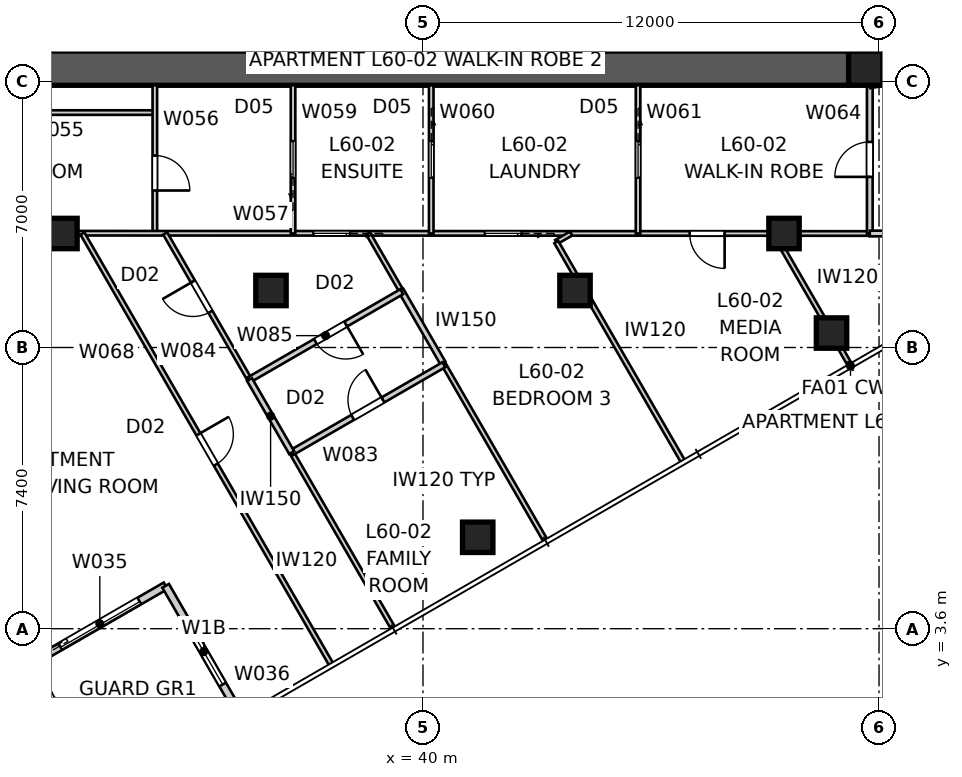
"""IFC4 building model, lengths in metres.
Left out: names, types, materials, properties, quantities, classifications, styles, units other than length and angle.
Written with IfcOpenShell. Run it as: python <this file> out.ifc"""

import sys

from ifc_helpers import new_model, si_unit, direction, frame, frame_2d, origin, origin_2d, place, context, subcontext, project, spatial, polyline, rectangle, outline, extrude, element, fill, save


model = new_model("IFC4")
c1 = context("Model", 3, precision=1e-05, world=origin(), true_north=direction((0.0, 1.0)))
c2 = subcontext(c1, "Body", "Model", "MODEL_VIEW")
j1 = project(units=[si_unit("LENGTHUNIT", "METRE"), si_unit("PLANEANGLEUNIT", "RADIAN")], contexts=[c1])
p1 = place(None, origin())
s1 = spatial("IfcSite", under=j1, at=p1, CompositionType="ELEMENT")
p2 = place(p1, origin())
s2 = spatial("IfcBuilding", under=s1, at=p2, CompositionType="ELEMENT")
p3 = place(p2, frame((0.0, 0.0, 218.4)))
s3 = spatial("IfcBuildingStorey", under=s2, at=p3, CompositionType="ELEMENT", Elevation=218.4)
p4 = place(p3, frame((51.2, 18.35, 0.0), z_axis=(0.0, 0.0, 1.0), x_axis=(-1.0, 0.0, 0.0)))
e1 = element("IfcWall", 1, at=p4, inside=s3, PredefinedType="SHEAR", context=c2, shape_type="SweptSolid", body=[
    extrude(outline(polyline([(0.0, -0.45), (22.4, -0.45), (22.4, -0.025), (22.85, -0.025), (22.85, 0.025), (22.4, 0.025), (22.4, 0.45), (0.0, 0.45), (0.0, 0.025), (-0.45, 0.025), (-0.45, -0.025), (0.0, -0.025), (0.0, -0.45)])), origin(), (0.0, 0.0, 1.0), 3.4),
])
p5 = place(p3, frame((51.65, 18.8, 0.0), z_axis=(0.0, 0.0, 1.0), x_axis=(0.0, 1.0, 0.0)))
e2 = element("IfcWall", 2, at=p5, inside=s3, PredefinedType="SHEAR", context=c2, shape_type="SweptSolid", body=[
    extrude(outline(polyline([(0.0, -0.45), (22.4, -0.45), (22.4, -0.025), (22.85, -0.025), (22.85, 0.025), (22.4, 0.025), (22.4, 0.45), (0.0, 0.45), (0.0, 0.025), (-0.45, 0.025), (-0.45, -0.025), (0.0, -0.025), (0.0, -0.45)])), origin(), (0.0, 0.0, 1.0), 3.4),
])
p6 = place(p5, frame((11.14, 0.0, 0.0)))
e3 = element("IfcOpeningElement", 3, at=p6, cuts=e2, PredefinedType="OPENING", context=c2, shape_type="SweptSolid", body=[
    extrude(rectangle(XDim=1.02, YDim=2.4, at=frame_2d((0.51, 1.2))), frame((0.0, 0.46, 0.0), z_axis=(0.0, -1.0, 0.0), x_axis=(1.0, 0.0, 0.0)), (0.0, 0.0, 1.0), 0.92),
])
p7 = place(p3, frame((51.65, 18.35, 0.0), z_axis=(0.0, 0.0, 1.0), x_axis=(1.0, 0.0, 0.0)))
e4 = element("IfcColumn", 4, at=p7, inside=s3, PredefinedType="COLUMN", context=c2, shape_type="SweptSolid", body=[
    extrude(rectangle(XDim=0.9, YDim=0.9, at=origin_2d()), origin(), (0.0, 0.0, 1.0), 3.4),
])
for number, where, z_axis, x_axis in (
    (5, (41.44, 6.005, 0.0), (0.0, 0.0, 1.0), (1.0, 0.0, 0.0)),
    (6, (50.75, 11.38, 0.0), (0.0, 0.0, 1.0), (1.0, 0.0, 0.0)),
    (7, (30.5, 14.0, 0.0), (0.0, 0.0, 1.0), (1.0, 0.0, 0.0)),
    (8, (36.0, 12.5, 0.0), (0.0, 0.0, 1.0), (1.0, 0.0, 0.0)),
    (9, (44.0, 12.5, 0.0), (0.0, 0.0, 1.0), (1.0, 0.0, 0.0)),
    (10, (49.5, 14.0, 0.0), (0.0, 0.0, 1.0), (1.0, 0.0, 0.0)),
):
    element("IfcColumn", number, at=place(p3, frame(where, z_axis=z_axis, x_axis=x_axis)), inside=s3, PredefinedType="COLUMN", context=c2, shape_type="SweptSolid", body=[
        extrude(rectangle(XDim=0.8, YDim=0.8, at=origin_2d()), origin(), (0.0, 0.0, 1.0), 3.4),
    ])
p8 = place(p3, frame((29.764, 2.729, 0.0), z_axis=(0.0, 0.0, 1.0), x_axis=(0.866026010844, 0.49999894854, 0.0)))
e11 = element("IfcWall", 11, at=p8, inside=s3, PredefinedType="SOLIDWALL", context=c2, shape_type="SweptSolid", body=[
    extrude(rectangle(XDim=4.0, YDim=0.2, at=frame_2d((2.0, 0.0))), origin(), (0.0, 0.0, 1.0), 3.25),
])
p9 = place(p8, frame((0.8, 0.0, 0.0)))
e12 = element("IfcOpeningElement", 12, at=p9, cuts=e11, PredefinedType="OPENING", context=c2, shape_type="SweptSolid", body=[
    extrude(rectangle(XDim=2.4, YDim=2.1, at=frame_2d((1.2, 1.05))), frame((0.0, 0.11, 0.0), z_axis=(0.0, -1.0, 0.0), x_axis=(1.0, 0.0, 0.0)), (0.0, 0.0, 1.0), 0.22),
])
p10 = place(p3, frame((33.229, 4.729, 0.0), z_axis=(0.0, 0.0, 1.0), x_axis=(0.49999894854, -0.866026010844, 0.0)))
e13 = element("IfcWall", 13, at=p10, inside=s3, PredefinedType="SOLIDWALL", context=c2, shape_type="SweptSolid", body=[
    extrude(rectangle(XDim=4.0, YDim=0.2, at=frame_2d((2.0, 0.0))), origin(), (0.0, 0.0, 1.0), 3.25),
])
p11 = place(p10, frame((1.0, 0.0, 0.45)))
e14 = element("IfcOpeningElement", 14, at=p11, cuts=e13, PredefinedType="OPENING", context=c2, shape_type="SweptSolid", body=[
    extrude(rectangle(XDim=2.0, YDim=1.8, at=frame_2d((1.0, 0.9))), frame((0.0, 0.11, 0.0), z_axis=(0.0, -1.0, 0.0), x_axis=(1.0, 0.0, 0.0)), (0.0, 0.0, 1.0), 0.22),
])
p12 = place(p3, frame((32.944, 17.183, 0.0), z_axis=(0.0, 0.0, 1.0), x_axis=(-1.0, 0.0, 0.0)))
e15 = element("IfcWall", 15, at=p12, inside=s3, PredefinedType="PARTITIONING", context=c2, shape_type="SweptSolid", body=[
    extrude(rectangle(XDim=8.944, YDim=0.12, at=frame_2d((4.472, 0.0))), origin(), (0.0, 0.0, 1.0), 3.25),
])
p13 = place(p12, frame((5.192, 0.0, 0.0)))
e16 = element("IfcOpeningElement", 16, at=p13, cuts=e15, PredefinedType="OPENING", context=c2, shape_type="SweptSolid", body=[
    extrude(rectangle(XDim=0.96, YDim=2.1, at=frame_2d((0.48, 1.05))), frame((0.0, 0.07, 0.0), z_axis=(0.0, -1.0, 0.0), x_axis=(1.0, 0.0, 0.0)), (0.0, 0.0, 1.0), 0.14),
])
p14 = place(p3, frame((32.944, 17.9, 0.0), z_axis=(0.0, 0.0, 1.0), x_axis=(0.0, -1.0, 0.0)))
e17 = element("IfcWall", 17, at=p14, inside=s3, PredefinedType="PARTITIONING", context=c2, shape_type="SweptSolid", body=[
    extrude(rectangle(XDim=3.9, YDim=0.12, at=frame_2d((1.95, 0.0))), origin(), (0.0, 0.0, 1.0), 3.25),
])
p15 = place(p14, frame((1.849, 0.0, 0.0)))
e18 = element("IfcOpeningElement", 18, at=p15, cuts=e17, PredefinedType="OPENING", context=c2, shape_type="SweptSolid", body=[
    extrude(rectangle(XDim=0.92, YDim=2.34, at=frame_2d((0.46, 1.17))), frame((0.0, 0.07, 0.0), z_axis=(0.0, -1.0, 0.0), x_axis=(1.0, 0.0, 0.0)), (0.0, 0.0, 1.0), 0.14),
])
p16 = place(p3, frame((51.757, 14.0, 0.0), z_axis=(0.0, 0.0, 1.0), x_axis=(-0.999999938148, 0.000351716958, 0.0)))
e19 = element("IfcWall", 19, at=p16, inside=s3, PredefinedType="PARTITIONING", context=c2, shape_type="SweptSolid", body=[
    extrude(rectangle(XDim=28.46, YDim=0.12, at=frame_2d((14.23, 0.0))), origin(), (0.0, 0.0, 1.0), 2.55),
])
p17 = place(p16, frame((3.82, 0.0, 0.0)))
e20 = element("IfcOpeningElement", 20, at=p17, cuts=e19, PredefinedType="OPENING", context=c2, shape_type="SweptSolid", body=[
    extrude(rectangle(XDim=0.92, YDim=2.34, at=frame_2d((0.46, 1.17))), frame((0.0, 0.07, 0.0), z_axis=(0.0, -1.0, 0.0), x_axis=(1.0, 0.0, 0.0)), (0.0, 0.0, 1.0), 0.14),
])
p18 = place(p16, frame((9.17, 0.0, 0.0)))
e21 = element("IfcOpeningElement", 21, at=p18, cuts=e19, PredefinedType="OPENING", context=c2, shape_type="SweptSolid", body=[
    extrude(rectangle(XDim=0.96, YDim=2.1, at=frame_2d((0.48, 1.05))), frame((0.0, 0.07, 0.0), z_axis=(0.0, -1.0, 0.0), x_axis=(1.0, 0.0, 0.0)), (0.0, 0.0, 1.0), 0.14),
])
p19 = place(p16, frame((13.68, 0.0, 0.0)))
e22 = element("IfcOpeningElement", 22, at=p19, cuts=e19, PredefinedType="OPENING", context=c2, shape_type="SweptSolid", body=[
    extrude(rectangle(XDim=0.96, YDim=2.1, at=frame_2d((0.48, 1.05))), frame((0.0, 0.07, 0.0), z_axis=(0.0, -1.0, 0.0), x_axis=(1.0, 0.0, 0.0)), (0.0, 0.0, 1.0), 0.14),
])
p20 = place(p16, frame((23.854, 0.0, 0.0)))
e23 = element("IfcOpeningElement", 23, at=p20, cuts=e19, PredefinedType="OPENING", context=c2, shape_type="SweptSolid", body=[
    extrude(rectangle(XDim=0.92, YDim=2.34, at=frame_2d((0.46, 1.17))), frame((0.0, 0.07, 0.0), z_axis=(0.0, -1.0, 0.0), x_axis=(1.0, 0.0, 0.0)), (0.0, 0.0, 1.0), 0.14),
])
p21 = place(p3, frame((36.581, 14.0, 0.0), z_axis=(0.0, 0.0, 1.0), x_axis=(0.0, 1.0, 0.0)))
e24 = element("IfcWall", 24, at=p21, inside=s3, PredefinedType="PARTITIONING", context=c2, shape_type="SweptSolid", body=[
    extrude(rectangle(XDim=3.9, YDim=0.12, at=frame_2d((1.95, 0.0))), origin(), (0.0, 0.0, 1.0), 3.25),
])
p22 = place(p21, frame((1.47, 0.0, 0.0)))
e25 = element("IfcOpeningElement", 25, at=p22, cuts=e24, PredefinedType="OPENING", context=c2, shape_type="SweptSolid", body=[
    extrude(rectangle(XDim=0.96, YDim=2.1, at=frame_2d((0.48, 1.05))), frame((0.0, 0.07, 0.0), z_axis=(0.0, -1.0, 0.0), x_axis=(1.0, 0.0, 0.0)), (0.0, 0.0, 1.0), 0.14),
])
p23 = place(p3, frame((40.217, 17.9, 0.0), z_axis=(0.0, 0.0, 1.0), x_axis=(0.0, -1.0, 0.0)))
e26 = element("IfcWall", 26, at=p23, inside=s3, PredefinedType="PARTITIONING", context=c2, shape_type="SweptSolid", body=[
    extrude(rectangle(XDim=3.9, YDim=0.12, at=frame_2d((1.95, 0.0))), origin(), (0.0, 0.0, 1.0), 3.25),
])
p24 = place(p23, frame((1.47, 0.0, 0.0)))
e27 = element("IfcOpeningElement", 27, at=p24, cuts=e26, PredefinedType="OPENING", context=c2, shape_type="SweptSolid", body=[
    extrude(rectangle(XDim=0.96, YDim=2.1, at=frame_2d((0.48, 1.05))), frame((0.0, 0.07, 0.0), z_axis=(0.0, -1.0, 0.0), x_axis=(1.0, 0.0, 0.0)), (0.0, 0.0, 1.0), 0.14),
])
p25 = place(p3, frame((45.659, 17.9, 0.0), z_axis=(0.0, 0.0, 1.0), x_axis=(0.0, -1.0, 0.0)))
e28 = element("IfcWall", 28, at=p25, inside=s3, PredefinedType="PARTITIONING", context=c2, shape_type="SweptSolid", body=[
    extrude(rectangle(XDim=3.9, YDim=0.12, at=frame_2d((1.95, 0.0))), origin(), (0.0, 0.0, 1.0), 3.25),
])
p26 = place(p25, frame((1.47, 0.0, 0.0)))
e29 = element("IfcOpeningElement", 29, at=p26, cuts=e28, PredefinedType="OPENING", context=c2, shape_type="SweptSolid", body=[
    extrude(rectangle(XDim=0.96, YDim=2.1, at=frame_2d((0.48, 1.05))), frame((0.0, 0.07, 0.0), z_axis=(0.0, -1.0, 0.0), x_axis=(1.0, 0.0, 0.0)), (0.0, 0.0, 1.0), 0.14),
])
p27 = place(p3, frame((52.1, 17.956, 0.0), z_axis=(0.0, 0.0, 1.0), x_axis=(0.0, 1.0, 0.0)))
e30 = element("IfcWall", 30, at=p27, inside=s3, PredefinedType="PARTITIONING", context=c2, shape_type="SweptSolid", body=[
    extrude(rectangle(XDim=0.864, YDim=0.12, at=frame_2d((0.432, 0.0))), origin(), (0.0, 0.0, 1.0), 3.25),
])
p28 = place(p3, frame((51.757, 14.0, 0.0), z_axis=(0.0, 0.0, 1.0), x_axis=(0.0, 1.0, 0.0)))
e31 = element("IfcWall", 31, at=p28, inside=s3, PredefinedType="SOLIDWALL", context=c2, shape_type="SweptSolid", body=[
    extrude(rectangle(XDim=3.9, YDim=0.15, at=frame_2d((1.95, 0.0))), origin(), (0.0, 0.0, 1.0), 3.25),
])
p29 = place(p28, frame((1.49, 0.0, 0.0)))
e32 = element("IfcOpeningElement", 32, at=p29, cuts=e31, PredefinedType="OPENING", context=c2, shape_type="SweptSolid", body=[
    extrude(rectangle(XDim=0.92, YDim=2.1, at=frame_2d((0.46, 1.05))), frame((0.0, 0.085, 0.0), z_axis=(0.0, -1.0, 0.0), x_axis=(1.0, 0.0, 0.0)), (0.0, 0.0, 1.0), 0.17),
])
p30 = place(p3, frame((56.0, 14.0, 0.0), z_axis=(0.0, 0.0, 1.0), x_axis=(-1.0, 0.0, 0.0)))
e33 = element("IfcWall", 33, at=p30, inside=s3, PredefinedType="SOLIDWALL", context=c2, shape_type="SweptSolid", body=[
    extrude(rectangle(XDim=4.243, YDim=0.15, at=frame_2d((2.122, 0.0))), origin(), (0.0, 0.0, 1.0), 3.25),
])
p31 = place(p30, frame((1.661, 0.0, 0.0)))
e34 = element("IfcOpeningElement", 34, at=p31, cuts=e33, PredefinedType="OPENING", context=c2, shape_type="SweptSolid", body=[
    extrude(rectangle(XDim=0.92, YDim=2.34, at=frame_2d((0.46, 1.17))), frame((0.0, 0.085, 0.0), z_axis=(0.0, -1.0, 0.0), x_axis=(1.0, 0.0, 0.0)), (0.0, 0.0, 1.0), 0.17),
])
p32 = place(p3, frame((31.039, 14.0, 0.0), z_axis=(0.0, 0.0, 1.0), x_axis=(0.500006184843, -0.866021832934, 0.0)))
e35 = element("IfcWall", 35, at=p32, inside=s3, PredefinedType="PARTITIONING", context=c2, shape_type="SweptSolid", body=[
    extrude(rectangle(XDim=13.084, YDim=0.12, at=frame_2d((6.542, 0.0))), origin(), (0.0, 0.0, 1.0), 3.25),
])
p33 = place(p32, frame((6.102, 0.0, 0.0)))
e36 = element("IfcOpeningElement", 36, at=p33, cuts=e35, PredefinedType="OPENING", context=c2, shape_type="SweptSolid", body=[
    extrude(rectangle(XDim=0.92, YDim=2.34, at=frame_2d((0.46, 1.17))), frame((0.0, 0.07, 0.0), z_axis=(0.0, -1.0, 0.0), x_axis=(1.0, 0.0, 0.0)), (0.0, 0.0, 1.0), 0.14),
])
p34 = place(p3, frame((25.174, 10.759, 0.0), z_axis=(0.0, 0.0, 1.0), x_axis=(0.866023120914, 0.500003954026, 0.0)))
e37 = element("IfcWall", 37, at=p34, inside=s3, PredefinedType="PARTITIONING", context=c2, shape_type="SweptSolid", body=[
    extrude(rectangle(XDim=6.481, YDim=0.12, at=frame_2d((3.241, 0.0))), origin(), (0.0, 0.0, 1.0), 3.25),
])
p35 = place(p3, frame((43.219, 5.924, 0.0), z_axis=(0.0, 0.0, 1.0), x_axis=(-0.500003544594, 0.866023357302, 0.0)))
e38 = element("IfcWall", 38, at=p35, inside=s3, PredefinedType="PARTITIONING", context=c2, shape_type="SweptSolid", body=[
    extrude(rectangle(XDim=5.388, YDim=0.12, at=frame_2d((2.694, 0.0))), origin(), (0.0, 0.0, 1.0), 3.25),
])
p36 = place(p3, frame((43.897, 14.0, 0.0), z_axis=(0.0, 0.0, 1.0), x_axis=(-0.865896406789, -0.500223362819, 0.0)))
e39 = element("IfcWall", 39, at=p36, inside=s3, PredefinedType="PARTITIONING", context=c2, shape_type="SweptSolid", body=[
    extrude(rectangle(XDim=0.45, YDim=0.12, at=frame_2d((0.225, 0.0))), origin(), (0.0, 0.0, 1.0), 3.25),
])
p37 = place(p3, frame((43.507, 13.775, 0.0), z_axis=(0.0, 0.0, 1.0), x_axis=(0.500013541994, -0.866017585169, 0.0)))
e40 = element("IfcWall", 40, at=p37, inside=s3, PredefinedType="PARTITIONING", context=c2, shape_type="SweptSolid", body=[
    extrude(rectangle(XDim=6.655, YDim=0.12, at=frame_2d((3.328, 0.0))), origin(), (0.0, 0.0, 1.0), 3.25),
])
p38 = place(p3, frame((39.416, 12.512, 0.0), z_axis=(0.0, 0.0, 1.0), x_axis=(-0.500005339912, 0.866022320763, 0.0)))
e41 = element("IfcWall", 41, at=p38, inside=s3, PredefinedType="PARTITIONING", context=c2, shape_type="SweptSolid", body=[
    extrude(rectangle(XDim=1.718, YDim=0.12, at=frame_2d((0.859, 0.0))), origin(), (0.0, 0.0, 1.0), 3.25),
])
p39 = place(p3, frame((40.525, 10.59, 0.0), z_axis=(0.0, 0.0, 1.0), x_axis=(-0.499973265211, 0.866040838572, 0.0)))
e42 = element("IfcWall", 42, at=p39, inside=s3, PredefinedType="SOLIDWALL", context=c2, shape_type="SweptSolid", body=[
    extrude(rectangle(XDim=2.219, YDim=0.15, at=frame_2d((1.109, 0.0))), origin(), (0.0, 0.0, 1.0), 3.25),
])
p40 = place(p3, frame((51.23, 10.549, 0.0), z_axis=(0.0, 0.0, 1.0), x_axis=(-0.500007073895, 0.866021319631, 0.0)))
e43 = element("IfcWall", 43, at=p40, inside=s3, PredefinedType="PARTITIONING", context=c2, shape_type="SweptSolid", body=[
    extrude(rectangle(XDim=3.985, YDim=0.12, at=frame_2d((1.992, 0.0))), origin(), (0.0, 0.0, 1.0), 3.25),
])
p41 = place(p3, frame((39.214, 3.612, 0.0), z_axis=(0.0, 0.0, 1.0), x_axis=(-0.499995631649, 0.866027925839, 0.0)))
e44 = element("IfcWall", 44, at=p41, inside=s3, PredefinedType="PARTITIONING", context=c2, shape_type="SweptSolid", body=[
    extrude(rectangle(XDim=5.338, YDim=0.12, at=frame_2d((2.669, 0.0))), origin(), (0.0, 0.0, 1.0), 3.25),
])
p42 = place(p3, frame((36.545, 8.234, 0.0), z_axis=(0.0, 0.0, 1.0), x_axis=(0.866025598446, 0.499999662836, 0.0)))
e45 = element("IfcWall", 45, at=p42, inside=s3, PredefinedType="SOLIDWALL", context=c2, shape_type="SweptSolid", body=[
    extrude(rectangle(XDim=4.625, YDim=0.15, at=frame_2d((2.312, 0.0))), origin(), (0.0, 0.0, 1.0), 3.25),
])
p43 = place(p42, frame((1.853, 0.0, 0.0)))
e46 = element("IfcOpeningElement", 46, at=p43, cuts=e45, PredefinedType="OPENING", context=c2, shape_type="SweptSolid", body=[
    extrude(rectangle(XDim=0.92, YDim=2.34, at=frame_2d((0.46, 1.17))), frame((0.0, 0.085, 0.0), z_axis=(0.0, -1.0, 0.0), x_axis=(1.0, 0.0, 0.0)), (0.0, 0.0, 1.0), 0.17),
])
p44 = place(p3, frame((35.435, 10.156, 0.0), z_axis=(0.0, 0.0, 1.0), x_axis=(-0.499966886051, 0.866044521288, 0.0)))
e47 = element("IfcWall", 47, at=p44, inside=s3, PredefinedType="PARTITIONING", context=c2, shape_type="SweptSolid", body=[
    extrude(rectangle(XDim=4.438, YDim=0.12, at=frame_2d((2.219, 0.0))), origin(), (0.0, 0.0, 1.0), 3.25),
])
p45 = place(p44, frame((2.059, 0.0, 0.0)))
e48 = element("IfcOpeningElement", 48, at=p45, cuts=e47, PredefinedType="OPENING", context=c2, shape_type="SweptSolid", body=[
    extrude(rectangle(XDim=0.92, YDim=2.34, at=frame_2d((0.46, 1.17))), frame((0.0, 0.07, 0.0), z_axis=(0.0, -1.0, 0.0), x_axis=(1.0, 0.0, 0.0)), (0.0, 0.0, 1.0), 0.14),
])
p46 = place(p3, frame((39.441, 12.469, 0.0), z_axis=(0.0, 0.0, 1.0), x_axis=(-0.866025598446, -0.499999662836, 0.0)))
e49 = element("IfcWall", 49, at=p46, inside=s3, PredefinedType="SOLIDWALL", context=c2, shape_type="SweptSolid", body=[
    extrude(rectangle(XDim=4.625, YDim=0.15, at=frame_2d((2.312, 0.0))), origin(), (0.0, 0.0, 1.0), 3.25),
])
p47 = place(p46, frame((1.702, 0.0, 0.0)))
e50 = element("IfcOpeningElement", 50, at=p47, cuts=e49, PredefinedType="OPENING", context=c2, shape_type="SweptSolid", body=[
    extrude(rectangle(XDim=0.92, YDim=2.34, at=frame_2d((0.46, 1.17))), frame((0.0, 0.085, 0.0), z_axis=(0.0, -1.0, 0.0), x_axis=(1.0, 0.0, 0.0)), (0.0, 0.0, 1.0), 0.17),
])
p48 = place(p3, frame((35.435, 10.156, 0.0), z_axis=(0.0, 0.0, 1.0), x_axis=(0.500008142102, -0.866020702889, 0.0)))
e51 = element("IfcWall", 51, at=p48, inside=s3, PredefinedType="SOLIDWALL", context=c2, shape_type="SweptSolid", body=[
    extrude(rectangle(XDim=2.219, YDim=0.15, at=frame_2d((1.11, 0.0))), origin(), (0.0, 0.0, 1.0), 3.25),
])
p49 = place(p3, frame((51.757, 17.9, 0.0), z_axis=(0.0, 0.0, 1.0), x_axis=(0.986864404584, 0.161550756622, 0.0)))
e52 = element("IfcWall", 52, at=p49, inside=s3, PredefinedType="SOLIDWALL", context=c2, shape_type="SweptSolid", body=[
    extrude(rectangle(XDim=0.348, YDim=0.15, at=frame_2d((0.174, 0.0))), origin(), (0.0, 0.0, 1.0), 3.25),
])
p50 = place(p9, origin())
e53 = element("IfcDoor", 53, at=p50, inside=s3, OperationType="SLIDING_TO_LEFT", PredefinedType="DOOR", context=c2, shape_type="SweptSolid", body=[
    extrude(rectangle(XDim=2.4, YDim=2.1, at=frame_2d((1.2, 1.05))), frame((0.0, 0.025, 0.0), z_axis=(0.0, -1.0, 0.0), x_axis=(1.0, 0.0, 0.0)), (0.0, 0.0, 1.0), 0.05),
])
fill(e12, e53)
p51 = place(p11, origin())
e54 = element("IfcWindow", 54, at=p51, inside=s3, PartitioningType="SINGLE_PANEL", PredefinedType="WINDOW", context=c2, shape_type="SweptSolid", body=[
    extrude(rectangle(XDim=2.0, YDim=1.8, at=frame_2d((1.0, 0.9))), frame((0.0, 0.03, 0.0), z_axis=(0.0, -1.0, 0.0), x_axis=(1.0, 0.0, 0.0)), (0.0, 0.0, 1.0), 0.06),
])
fill(e14, e54)
p52 = place(p29, origin())
e55 = element("IfcDoor", 55, at=p52, inside=s3, OperationType="SINGLE_SWING_LEFT", PredefinedType="DOOR", context=c2, shape_type="SweptSolid", body=[
    extrude(rectangle(XDim=0.92, YDim=2.1, at=frame_2d((0.46, 1.05))), frame((0.0, 0.025, 0.0), z_axis=(0.0, -1.0, 0.0), x_axis=(1.0, 0.0, 0.0)), (0.0, 0.0, 1.0), 0.05),
])
fill(e32, e55)
p53 = place(p26, origin())
e56 = element("IfcDoor", 56, at=p53, inside=s3, OperationType="SLIDING_TO_LEFT", PredefinedType="DOOR", context=c2, shape_type="SweptSolid", body=[
    extrude(rectangle(XDim=0.96, YDim=2.1, at=frame_2d((0.48, 1.05))), frame((0.0, 0.025, 0.0), z_axis=(0.0, -1.0, 0.0), x_axis=(1.0, 0.0, 0.0)), (0.0, 0.0, 1.0), 0.05),
])
fill(e29, e56)
p54 = place(p17, origin())
e57 = element("IfcDoor", 57, at=p54, inside=s3, OperationType="SINGLE_SWING_LEFT", PredefinedType="DOOR", context=c2, shape_type="SweptSolid", body=[
    extrude(rectangle(XDim=0.92, YDim=2.34, at=frame_2d((0.46, 1.17))), frame((0.0, 0.025, 0.0), z_axis=(0.0, -1.0, 0.0), x_axis=(1.0, 0.0, 0.0)), (0.0, 0.0, 1.0), 0.05),
])
fill(e20, e57)
p55 = place(p24, origin())
e58 = element("IfcDoor", 58, at=p55, inside=s3, OperationType="SLIDING_TO_LEFT", PredefinedType="DOOR", context=c2, shape_type="SweptSolid", body=[
    extrude(rectangle(XDim=0.96, YDim=2.1, at=frame_2d((0.48, 1.05))), frame((0.0, 0.025, 0.0), z_axis=(0.0, -1.0, 0.0), x_axis=(1.0, 0.0, 0.0)), (0.0, 0.0, 1.0), 0.05),
])
fill(e27, e58)
p56 = place(p18, origin())
e59 = element("IfcDoor", 59, at=p56, inside=s3, OperationType="SLIDING_TO_LEFT", PredefinedType="DOOR", context=c2, shape_type="SweptSolid", body=[
    extrude(rectangle(XDim=0.96, YDim=2.1, at=frame_2d((0.48, 1.05))), frame((0.0, 0.025, 0.0), z_axis=(0.0, -1.0, 0.0), x_axis=(1.0, 0.0, 0.0)), (0.0, 0.0, 1.0), 0.05),
])
fill(e21, e59)
p57 = place(p22, origin())
e60 = element("IfcDoor", 60, at=p57, inside=s3, OperationType="SLIDING_TO_LEFT", PredefinedType="DOOR", context=c2, shape_type="SweptSolid", body=[
    extrude(rectangle(XDim=0.96, YDim=2.1, at=frame_2d((0.48, 1.05))), frame((0.0, 0.025, 0.0), z_axis=(0.0, -1.0, 0.0), x_axis=(1.0, 0.0, 0.0)), (0.0, 0.0, 1.0), 0.05),
])
fill(e25, e60)
p58 = place(p19, origin())
e61 = element("IfcDoor", 61, at=p58, inside=s3, OperationType="SLIDING_TO_LEFT", PredefinedType="DOOR", context=c2, shape_type="SweptSolid", body=[
    extrude(rectangle(XDim=0.96, YDim=2.1, at=frame_2d((0.48, 1.05))), frame((0.0, 0.025, 0.0), z_axis=(0.0, -1.0, 0.0), x_axis=(1.0, 0.0, 0.0)), (0.0, 0.0, 1.0), 0.05),
])
fill(e22, e61)
p59 = place(p15, origin())
e62 = element("IfcDoor", 62, at=p59, inside=s3, OperationType="SINGLE_SWING_RIGHT", PredefinedType="DOOR", context=c2, shape_type="SweptSolid", body=[
    extrude(rectangle(XDim=0.92, YDim=2.34, at=frame_2d((0.46, 1.17))), frame((0.0, 0.025, 0.0), z_axis=(0.0, -1.0, 0.0), x_axis=(1.0, 0.0, 0.0)), (0.0, 0.0, 1.0), 0.05),
])
fill(e18, e62)
p60 = place(p47, origin())
e63 = element("IfcDoor", 63, at=p60, inside=s3, OperationType="SINGLE_SWING_LEFT", PredefinedType="DOOR", context=c2, shape_type="SweptSolid", body=[
    extrude(rectangle(XDim=0.92, YDim=2.34, at=frame_2d((0.46, 1.17))), frame((0.0, 0.025, 0.0), z_axis=(0.0, -1.0, 0.0), x_axis=(1.0, 0.0, 0.0)), (0.0, 0.0, 1.0), 0.05),
])
fill(e50, e63)
p61 = place(p45, origin())
e64 = element("IfcDoor", 64, at=p61, inside=s3, OperationType="SINGLE_SWING_RIGHT", PredefinedType="DOOR", context=c2, shape_type="SweptSolid", body=[
    extrude(rectangle(XDim=0.92, YDim=2.34, at=frame_2d((0.46, 1.17))), frame((0.0, 0.025, 0.0), z_axis=(0.0, -1.0, 0.0), x_axis=(1.0, 0.0, 0.0)), (0.0, 0.0, 1.0), 0.05),
])
fill(e48, e64)
p62 = place(p43, origin())
e65 = element("IfcDoor", 65, at=p62, inside=s3, OperationType="SINGLE_SWING_RIGHT", PredefinedType="DOOR", context=c2, shape_type="SweptSolid", body=[
    extrude(rectangle(XDim=0.92, YDim=2.34, at=frame_2d((0.46, 1.17))), frame((0.0, 0.025, 0.0), z_axis=(0.0, -1.0, 0.0), x_axis=(1.0, 0.0, 0.0)), (0.0, 0.0, 1.0), 0.05),
])
fill(e46, e65)
p63 = place(p33, origin())
e66 = element("IfcDoor", 66, at=p63, inside=s3, OperationType="SINGLE_SWING_LEFT", PredefinedType="DOOR", context=c2, shape_type="SweptSolid", body=[
    extrude(rectangle(XDim=0.92, YDim=2.34, at=frame_2d((0.46, 1.17))), frame((0.0, 0.025, 0.0), z_axis=(0.0, -1.0, 0.0), x_axis=(1.0, 0.0, 0.0)), (0.0, 0.0, 1.0), 0.05),
])
fill(e36, e66)
save(model, sys.argv[1])
